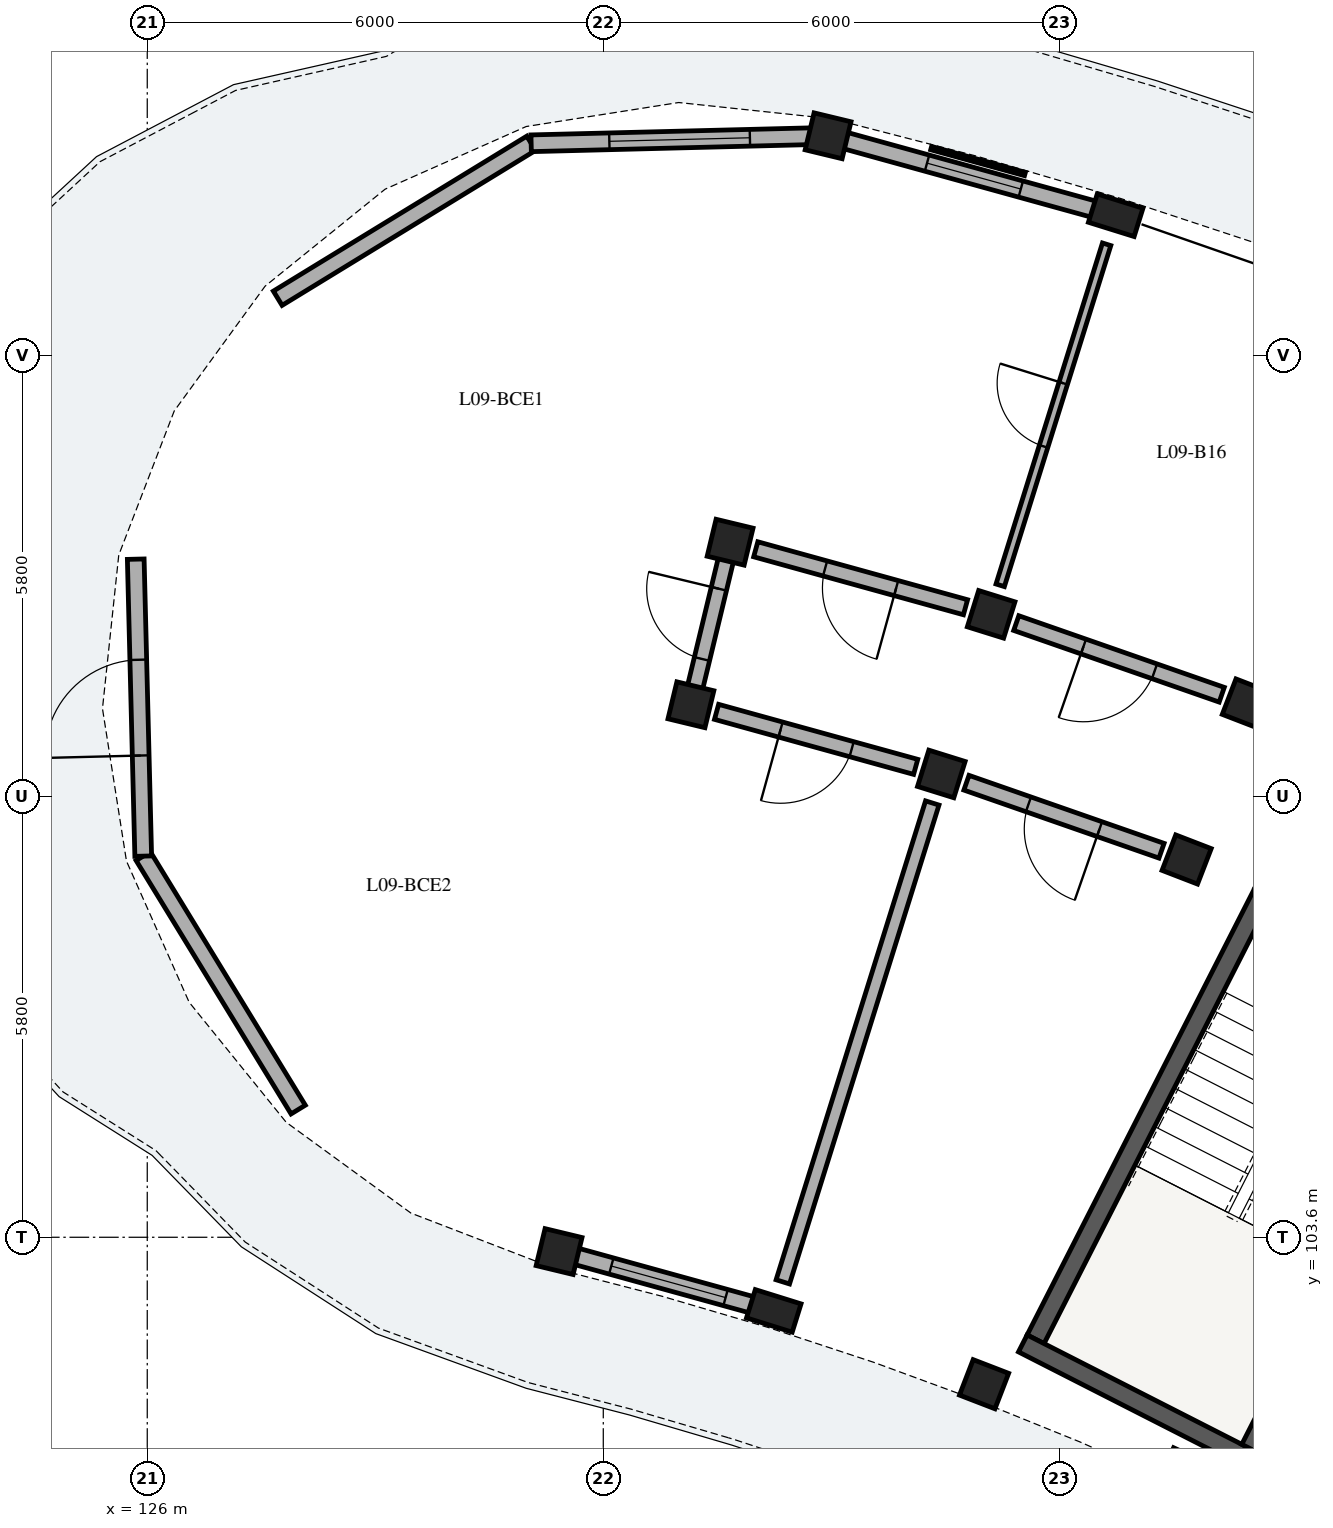
"""IFC4 building model, lengths in metres.
Left out: names, types, materials, properties, quantities, classifications, styles, units other than length and angle.
Written with IfcOpenShell. Run it as: python <this file> out.ifc"""

import sys

from ifc_helpers import new_model, si_unit, direction, frame, frame_2d, origin, origin_2d, place, context, subcontext, project, spatial, rectangle, extrude, element, fill, save


model = new_model("IFC4")
c1 = context("Model", 3, precision=1e-05, world=origin(), true_north=direction((0.0, 1.0)))
c2 = subcontext(c1, "Body", "Model", "MODEL_VIEW")
j1 = project(units=[si_unit("LENGTHUNIT", "METRE"), si_unit("PLANEANGLEUNIT", "RADIAN")], contexts=[c1])
p1 = place(None, origin())
s1 = spatial("IfcSite", under=j1, at=p1, CompositionType="ELEMENT")
p2 = place(p1, origin())
s2 = spatial("IfcBuilding", under=s1, at=p2, CompositionType="ELEMENT")
p3 = place(p2, frame((0.0, 0.0, 32.36)))
s3 = spatial("IfcBuildingStorey", under=s2, at=p3, CompositionType="ELEMENT", Elevation=32.36)
p4 = place(p3, frame((140.684, 108.139, 0.0), z_axis=(0.0, 0.0, 1.0), x_axis=(-0.453992276384, -0.891005618941, 0.0)))
e1 = element("IfcWall", 1, at=p4, inside=s3, PredefinedType="SHEAR", context=c2, shape_type="SweptSolid", body=[
    extrude(rectangle(XDim=6.6, YDim=0.25, at=frame_2d((3.3, 0.0))), origin(), (0.0, 0.0, 1.0), 3.11),
])
p5 = place(p3, frame((137.52, 102.203, 0.0), z_axis=(0.0, 0.0, 1.0), x_axis=(0.891003540237, -0.453996356025, 0.0)))
e2 = element("IfcWall", 2, at=p5, inside=s3, PredefinedType="SHEAR", context=c2, shape_type="SweptSolid", body=[
    extrude(rectangle(XDim=3.42, YDim=0.25, at=frame_2d((1.71, 0.0))), origin(), (0.0, 0.0, 1.0), 3.11),
])
p6 = place(p3, frame((143.509, 106.699, 0.0), z_axis=(0.0, 0.0, 1.0), x_axis=(-0.453992276384, -0.891005618941, 0.0)))
e3 = element("IfcWall", 3, at=p6, inside=s3, PredefinedType="SHEAR", context=c2, shape_type="SweptSolid", body=[
    extrude(rectangle(XDim=6.6, YDim=0.25, at=frame_2d((3.3, 0.0))), origin(), (0.0, 0.0, 1.0), 3.11),
])
p7 = place(p6, frame((0.22, 0.0, 0.0)))
e4 = element("IfcOpeningElement", 4, at=p7, cuts=e3, PredefinedType="OPENING", context=c2, shape_type="SweptSolid", body=[
    extrude(rectangle(XDim=1.05, YDim=2.15, at=frame_2d((0.525, 1.075))), frame((0.0, 0.135, 0.0), z_axis=(0.0, -1.0, 0.0), x_axis=(1.0, 0.0, 0.0)), (0.0, 0.0, 1.0), 0.27),
])
p8 = place(p3, frame((139.707, 100.522, 0.0), z_axis=(0.0, 0.0, 1.0), x_axis=(0.420859860775, 0.907125668024, 0.0)))
e5 = element("IfcColumn", 5, at=p8, inside=s3, PredefinedType="PILASTER", context=c2, shape_type="SweptSolid", body=[
    extrude(rectangle(XDim=0.39, YDim=0.63, at=origin_2d()), origin(), (0.0, 0.0, 1.0), 3.115),
])
for number, where, z_axis, x_axis in (
    (6, (137.01, 101.667, 0.0), (0.0, 0.0, 1.0), (0.36, 0.933, 0.0)),
    (7, (139.675, 108.57, 0.0), (0.0, 0.0, 1.0), (0.36, 0.933, 0.0)),
    (8, (140.468, 110.622, 0.0), (0.0, 0.0, 1.0), (0.36, 0.933, 0.0)),
):
    element("IfcColumn", number, at=place(p3, frame(where, z_axis=z_axis, x_axis=x_axis)), inside=s3, PredefinedType="COLUMN", context=c2, shape_type="SweptSolid", body=[
        extrude(rectangle(XDim=0.5, YDim=0.5, at=origin_2d()), origin(), (0.0, 0.0, 1.0), 3.115),
    ])
p9 = place(p3, frame((134.243, 102.631, 0.0), z_axis=(0.0, 0.0, 1.0), x_axis=(0.297930225503, 0.954587649581, 0.0)))
e9 = element("IfcColumn", 9, at=p9, inside=s3, PredefinedType="PILASTER", context=c2, shape_type="SweptSolid", body=[
    extrude(rectangle(XDim=0.39, YDim=0.63, at=origin_2d()), origin(), (0.0, 0.0, 1.0), 3.115),
])
for number, where, z_axis, x_axis in (
    (10, (136.448, 109.695, 0.0), (0.0, 0.0, 1.0), (0.298, 0.955, 0.0)),
    (11, (137.103, 111.795, 0.0), (0.0, 0.0, 1.0), (0.298, 0.955, 0.0)),
):
    element("IfcColumn", number, at=place(p3, frame(where, z_axis=z_axis, x_axis=x_axis)), inside=s3, PredefinedType="COLUMN", context=c2, shape_type="SweptSolid", body=[
        extrude(rectangle(XDim=0.5, YDim=0.5, at=origin_2d()), origin(), (0.0, 0.0, 1.0), 3.115),
    ])
p10 = place(p3, frame((138.742, 117.046, 0.0), z_axis=(0.0, 0.0, 1.0), x_axis=(0.297930225503, 0.954587649581, 0.0)))
e12 = element("IfcColumn", 12, at=p10, inside=s3, PredefinedType="PILASTER", context=c2, shape_type="SweptSolid", body=[
    extrude(rectangle(XDim=0.39, YDim=0.63, at=origin_2d()), origin(), (0.0, 0.0, 1.0), 3.115),
])
for number, where, z_axis, x_axis in (
    (13, (131.418, 103.412, 0.0), (0.0, 0.0, 1.0), (0.234, 0.972, 0.0)),
    (14, (133.153, 110.606, 0.0), (0.0, 0.0, 1.0), (0.234, 0.972, 0.0)),
    (15, (133.669, 112.744, 0.0), (0.0, 0.0, 1.0), (0.234, 0.972, 0.0)),
    (16, (134.958, 118.091, 0.0), (0.0, 0.0, 1.0), (0.234, 0.972, 0.0)),
):
    element("IfcColumn", number, at=place(p3, frame(where, z_axis=z_axis, x_axis=x_axis)), inside=s3, PredefinedType="COLUMN", context=c2, shape_type="SweptSolid", body=[
        extrude(rectangle(XDim=0.5, YDim=0.5, at=origin_2d()), origin(), (0.0, 0.0, 1.0), 3.115),
    ])
p11 = place(p3, frame((138.583, 117.09, 0.0), z_axis=(0.0, 0.0, 1.0), x_axis=(-0.963891366843, 0.266295762125, 0.0)))
e17 = element("IfcWall", 17, at=p11, inside=s3, PredefinedType="SOLIDWALL", context=c2, shape_type="SweptSolid", body=[
    extrude(rectangle(XDim=3.541, YDim=0.22, at=frame_2d((1.771, 0.0))), origin(), (0.0, 0.0, 1.0), 2.355),
])
p12 = place(p11, frame((1.13, 0.0, 0.55)))
e18 = element("IfcOpeningElement", 18, at=p12, cuts=e17, PredefinedType="OPENING", context=c2, shape_type="SweptSolid", body=[
    extrude(rectangle(XDim=1.28, YDim=1.56, at=frame_2d((0.64, 0.78))), frame((0.0, 0.12, 0.0), z_axis=(0.0, -1.0, 0.0), x_axis=(1.0, 0.0, 0.0)), (0.0, 0.0, 1.0), 0.24),
])
p13 = place(p3, frame((134.084, 102.675, 0.0), z_axis=(0.0, 0.0, 1.0), x_axis=(-0.963872968618, 0.26636234788, 0.0)))
e19 = element("IfcWall", 19, at=p13, inside=s3, PredefinedType="SOLIDWALL", context=c2, shape_type="SweptSolid", body=[
    extrude(rectangle(XDim=2.545, YDim=0.22, at=frame_2d((1.273, 0.0))), origin(), (0.0, 0.0, 1.0), 2.355),
])
p14 = place(p13, frame((0.493, 0.0, 0.55)))
e20 = element("IfcOpeningElement", 20, at=p14, cuts=e19, PredefinedType="OPENING", context=c2, shape_type="SweptSolid", body=[
    extrude(rectangle(XDim=1.56, YDim=1.51, at=frame_2d((0.78, 0.755))), frame((0.0, 0.12, 0.0), z_axis=(0.0, -1.0, 0.0), x_axis=(1.0, 0.0, 0.0)), (0.0, 0.0, 1.0), 0.24),
])
p15 = place(p3, frame((127.986, 105.28, 0.0), z_axis=(0.0, 0.0, 1.0), x_axis=(-0.521652131435, 0.85315828178, 0.0)))
e21 = element("IfcWall", 21, at=p15, inside=s3, PredefinedType="SOLIDWALL", context=c2, shape_type="SweptSolid", body=[
    extrude(rectangle(XDim=3.908, YDim=0.22, at=frame_2d((1.954, 0.0))), origin(), (0.0, 0.0, 1.0), 2.355),
])
p16 = place(p3, frame((125.947, 108.614, 0.0), z_axis=(0.0, 0.0, 1.0), x_axis=(-0.02523880178, 0.999681450706, 0.0)))
e22 = element("IfcWall", 22, at=p16, inside=s3, PredefinedType="SOLIDWALL", context=c2, shape_type="SweptSolid", body=[
    extrude(rectangle(XDim=3.908, YDim=0.22, at=frame_2d((1.954, 0.0))), origin(), (0.0, 0.0, 1.0), 2.355),
])
p17 = place(p16, frame((1.324, 0.0, 0.0)))
e23 = element("IfcOpeningElement", 23, at=p17, cuts=e22, PredefinedType="OPENING", context=c2, shape_type="SweptSolid", body=[
    extrude(rectangle(XDim=1.26, YDim=2.18, at=frame_2d((0.63, 1.09))), frame((0.0, 0.12, 0.0), z_axis=(0.0, -1.0, 0.0), x_axis=(1.0, 0.0, 0.0)), (0.0, 0.0, 1.0), 0.24),
])
p18 = place(p3, frame((127.717, 115.954, 0.0), z_axis=(0.0, 0.0, 1.0), x_axis=(0.85314128216, 0.521679933171, 0.0)))
e24 = element("IfcWall", 24, at=p18, inside=s3, PredefinedType="SOLIDWALL", context=c2, shape_type="SweptSolid", body=[
    extrude(rectangle(XDim=3.908, YDim=0.22, at=frame_2d((1.954, 0.0))), origin(), (0.0, 0.0, 1.0), 2.355),
])
p19 = place(p3, frame((131.051, 117.993, 0.0), z_axis=(0.0, 0.0, 1.0), x_axis=(0.999683064576, 0.025174796915, 0.0)))
e25 = element("IfcWall", 25, at=p19, inside=s3, PredefinedType="SOLIDWALL", context=c2, shape_type="SweptSolid", body=[
    extrude(rectangle(XDim=3.908, YDim=0.22, at=frame_2d((1.954, 0.0))), origin(), (0.0, 0.0, 1.0), 2.355),
])
p20 = place(p19, frame((1.029, 0.0, 0.4)))
e26 = element("IfcOpeningElement", 26, at=p20, cuts=e25, PredefinedType="OPENING", context=c2, shape_type="SweptSolid", body=[
    extrude(rectangle(XDim=1.85, YDim=1.72, at=frame_2d((0.925, 0.86))), frame((0.0, 0.12, 0.0), z_axis=(0.0, -1.0, 0.0), x_axis=(1.0, 0.0, 0.0)), (0.0, 0.0, 1.0), 0.24),
])
p21 = place(p3, frame((140.137, 110.738, 0.0), z_axis=(0.0, 0.0, 1.0), x_axis=(-0.944253820929, 0.329218349522, 0.0)))
e27 = element("IfcWall", 27, at=p21, inside=s3, PredefinedType="PARTITIONING", context=c2, shape_type="SweptSolid", body=[
    extrude(rectangle(XDim=2.863, YDim=0.205, at=frame_2d((1.432, 0.0))), origin(), (0.0, 0.0, 1.0), 2.37),
])
p22 = place(p21, frame((0.937, 0.0, 0.0)))
e28 = element("IfcOpeningElement", 28, at=p22, cuts=e27, PredefinedType="OPENING", context=c2, shape_type="SweptSolid", body=[
    extrude(rectangle(XDim=0.99, YDim=2.16, at=frame_2d((0.495, 1.08))), frame((0.0, 0.113, 0.0), z_axis=(0.0, -1.0, 0.0), x_axis=(1.0, 0.0, 0.0)), (0.0, 0.0, 1.0), 0.225),
])
p23 = place(p3, frame((139.345, 108.685, 0.0), z_axis=(0.0, 0.0, 1.0), x_axis=(-0.944265123647, 0.329185929627, 0.0)))
e29 = element("IfcWall", 29, at=p23, inside=s3, PredefinedType="PARTITIONING", context=c2, shape_type="SweptSolid", body=[
    extrude(rectangle(XDim=2.718, YDim=0.205, at=frame_2d((1.359, 0.0))), origin(), (0.0, 0.0, 1.0), 2.37),
])
p24 = place(p23, frame((0.864, 0.0, 0.0)))
e30 = element("IfcOpeningElement", 30, at=p24, cuts=e29, PredefinedType="OPENING", context=c2, shape_type="SweptSolid", body=[
    extrude(rectangle(XDim=0.99, YDim=2.16, at=frame_2d((0.495, 1.08))), frame((0.0, 0.113, 0.0), z_axis=(0.0, -1.0, 0.0), x_axis=(1.0, 0.0, 0.0)), (0.0, 0.0, 1.0), 0.225),
])
p25 = place(p3, frame((137.222, 112.177, 0.0), z_axis=(0.0, 0.0, 1.0), x_axis=(0.297905254614, 0.954595442726, 0.0)))
e31 = element("IfcWall", 31, at=p25, inside=s3, PredefinedType="PARTITIONING", context=c2, shape_type="SweptSolid", body=[
    extrude(rectangle(XDim=4.7, YDim=0.115, at=frame_2d((2.35, 0.0))), origin(), (0.0, 0.0, 1.0), 2.37),
])
p26 = place(p25, frame((1.915, 0.0, 0.0)))
e32 = element("IfcOpeningElement", 32, at=p26, cuts=e31, PredefinedType="OPENING", context=c2, shape_type="SweptSolid", body=[
    extrude(rectangle(XDim=0.87, YDim=2.08, at=frame_2d((0.435, 1.04))), frame((0.0, 0.067, 0.0), z_axis=(0.0, -1.0, 0.0), x_axis=(1.0, 0.0, 0.0)), (0.0, 0.0, 1.0), 0.135),
])
p27 = place(p3, frame((134.362, 103.013, 0.0), z_axis=(0.0, 0.0, 1.0), x_axis=(0.2979590431, 0.954578655028, 0.0)))
e33 = element("IfcWall", 33, at=p27, inside=s3, PredefinedType="PARTITIONING", context=c2, shape_type="SweptSolid", body=[
    extrude(rectangle(XDim=6.6, YDim=0.185, at=frame_2d((3.3, 0.0))), origin(), (0.0, 0.0, 1.0), 2.37),
])
p28 = place(p3, frame((136.766, 111.889, 0.0), z_axis=(0.0, 0.0, 1.0), x_axis=(-0.963890789093, 0.266297853356, 0.0)))
e34 = element("IfcWall", 34, at=p28, inside=s3, PredefinedType="PARTITIONING", context=c2, shape_type="SweptSolid", body=[
    extrude(rectangle(XDim=2.863, YDim=0.205, at=frame_2d((1.432, 0.0))), origin(), (0.0, 0.0, 1.0), 2.37),
])
p29 = place(p28, frame((0.947, 0.0, 0.0)))
e35 = element("IfcOpeningElement", 35, at=p29, cuts=e34, PredefinedType="OPENING", context=c2, shape_type="SweptSolid", body=[
    extrude(rectangle(XDim=0.97, YDim=2.15, at=frame_2d((0.485, 1.075))), frame((0.0, 0.113, 0.0), z_axis=(0.0, -1.0, 0.0), x_axis=(1.0, 0.0, 0.0)), (0.0, 0.0, 1.0), 0.225),
])
p30 = place(p3, frame((136.11, 109.789, 0.0), z_axis=(0.0, 0.0, 1.0), x_axis=(-0.96388375821, 0.266323301006, 0.0)))
e36 = element("IfcWall", 36, at=p30, inside=s3, PredefinedType="PARTITIONING", context=c2, shape_type="SweptSolid", body=[
    extrude(rectangle(XDim=2.718, YDim=0.205, at=frame_2d((1.359, 0.0))), origin(), (0.0, 0.0, 1.0), 2.37),
])
p31 = place(p30, frame((0.874, 0.0, 0.0)))
e37 = element("IfcOpeningElement", 37, at=p31, cuts=e36, PredefinedType="OPENING", context=c2, shape_type="SweptSolid", body=[
    extrude(rectangle(XDim=0.97, YDim=2.15, at=frame_2d((0.485, 1.075))), frame((0.0, 0.113, 0.0), z_axis=(0.0, -1.0, 0.0), x_axis=(1.0, 0.0, 0.0)), (0.0, 0.0, 1.0), 0.225),
])
p32 = place(p3, frame((133.165, 110.654, 0.0), z_axis=(0.0, 0.0, 1.0), x_axis=(0.23437535251, 0.972146179407, 0.0)))
e38 = element("IfcWall", 38, at=p32, inside=s3, PredefinedType="PARTITIONING", context=c2, shape_type="SweptSolid", body=[
    extrude(rectangle(XDim=2.1, YDim=0.205, at=frame_2d((1.05, 0.0))), origin(), (0.0, 0.0, 1.0), 2.37),
])
p33 = place(p32, frame((0.57, 0.0, 0.0)))
e39 = element("IfcOpeningElement", 39, at=p33, cuts=e38, PredefinedType="OPENING", context=c2, shape_type="SweptSolid", body=[
    extrude(rectangle(XDim=0.95, YDim=2.13, at=frame_2d((0.475, 1.065))), frame((0.0, 0.113, 0.0), z_axis=(0.0, -1.0, 0.0), x_axis=(1.0, 0.0, 0.0)), (0.0, 0.0, 1.0), 0.225),
])
p34 = place(p12, origin())
e40 = element("IfcWindow", 40, at=p34, inside=s3, PartitioningType="SINGLE_PANEL", PredefinedType="WINDOW", context=c2, shape_type="SweptSolid", body=[
    extrude(rectangle(XDim=1.28, YDim=1.56, at=frame_2d((0.64, 0.78))), frame((0.0, 0.03, 0.0), z_axis=(0.0, -1.0, 0.0), x_axis=(1.0, 0.0, 0.0)), (0.0, 0.0, 1.0), 0.06),
])
fill(e18, e40)
p35 = place(p14, origin())
e41 = element("IfcWindow", 41, at=p35, inside=s3, PartitioningType="SINGLE_PANEL", PredefinedType="WINDOW", context=c2, shape_type="SweptSolid", body=[
    extrude(rectangle(XDim=1.56, YDim=1.51, at=frame_2d((0.78, 0.755))), frame((0.0, 0.03, 0.0), z_axis=(0.0, -1.0, 0.0), x_axis=(1.0, 0.0, 0.0)), (0.0, 0.0, 1.0), 0.06),
])
fill(e20, e41)
p36 = place(p17, origin())
e42 = element("IfcDoor", 42, at=p36, inside=s3, OperationType="SINGLE_SWING_LEFT", PredefinedType="DOOR", context=c2, shape_type="SweptSolid", body=[
    extrude(rectangle(XDim=1.26, YDim=2.18, at=frame_2d((0.63, 1.09))), frame((0.0, 0.025, 0.0), z_axis=(0.0, -1.0, 0.0), x_axis=(1.0, 0.0, 0.0)), (0.0, 0.0, 1.0), 0.05),
])
fill(e23, e42)
p37 = place(p20, origin())
e43 = element("IfcWindow", 43, at=p37, inside=s3, PartitioningType="SINGLE_PANEL", PredefinedType="WINDOW", context=c2, shape_type="SweptSolid", body=[
    extrude(rectangle(XDim=1.85, YDim=1.72, at=frame_2d((0.925, 0.86))), frame((0.0, 0.03, 0.0), z_axis=(0.0, -1.0, 0.0), x_axis=(1.0, 0.0, 0.0)), (0.0, 0.0, 1.0), 0.06),
])
fill(e26, e43)
p38 = place(p22, origin())
e44 = element("IfcDoor", 44, at=p38, inside=s3, OperationType="SINGLE_SWING_RIGHT", PredefinedType="DOOR", context=c2, shape_type="SweptSolid", body=[
    extrude(rectangle(XDim=0.99, YDim=2.16, at=frame_2d((0.495, 1.08))), frame((0.0, 0.025, 0.0), z_axis=(0.0, -1.0, 0.0), x_axis=(1.0, 0.0, 0.0)), (0.0, 0.0, 1.0), 0.05),
])
fill(e28, e44)
p39 = place(p24, origin())
e45 = element("IfcDoor", 45, at=p39, inside=s3, OperationType="SINGLE_SWING_LEFT", PredefinedType="DOOR", context=c2, shape_type="SweptSolid", body=[
    extrude(rectangle(XDim=0.99, YDim=2.16, at=frame_2d((0.495, 1.08))), frame((0.0, 0.025, 0.0), z_axis=(0.0, -1.0, 0.0), x_axis=(1.0, 0.0, 0.0)), (0.0, 0.0, 1.0), 0.05),
])
fill(e30, e45)
p40 = place(p26, origin())
e46 = element("IfcDoor", 46, at=p40, inside=s3, OperationType="SINGLE_SWING_RIGHT", PredefinedType="DOOR", context=c2, shape_type="SweptSolid", body=[
    extrude(rectangle(XDim=0.87, YDim=2.08, at=frame_2d((0.435, 1.04))), frame((0.0, 0.025, 0.0), z_axis=(0.0, -1.0, 0.0), x_axis=(1.0, 0.0, 0.0)), (0.0, 0.0, 1.0), 0.05),
])
fill(e32, e46)
p41 = place(p29, origin())
e47 = element("IfcDoor", 47, at=p41, inside=s3, OperationType="SINGLE_SWING_LEFT", PredefinedType="DOOR", context=c2, shape_type="SweptSolid", body=[
    extrude(rectangle(XDim=0.97, YDim=2.15, at=frame_2d((0.485, 1.075))), frame((0.0, 0.025, 0.0), z_axis=(0.0, -1.0, 0.0), x_axis=(1.0, 0.0, 0.0)), (0.0, 0.0, 1.0), 0.05),
])
fill(e35, e47)
p42 = place(p31, origin())
e48 = element("IfcDoor", 48, at=p42, inside=s3, OperationType="SINGLE_SWING_RIGHT", PredefinedType="DOOR", context=c2, shape_type="SweptSolid", body=[
    extrude(rectangle(XDim=0.97, YDim=2.15, at=frame_2d((0.485, 1.075))), frame((0.0, 0.025, 0.0), z_axis=(0.0, -1.0, 0.0), x_axis=(1.0, 0.0, 0.0)), (0.0, 0.0, 1.0), 0.05),
])
fill(e37, e48)
p43 = place(p33, origin())
e49 = element("IfcDoor", 49, at=p43, inside=s3, OperationType="SINGLE_SWING_RIGHT", PredefinedType="DOOR", context=c2, shape_type="SweptSolid", body=[
    extrude(rectangle(XDim=0.95, YDim=2.13, at=frame_2d((0.475, 1.065))), frame((0.0, 0.025, 0.0), z_axis=(0.0, -1.0, 0.0), x_axis=(1.0, 0.0, 0.0)), (0.0, 0.0, 1.0), 0.05),
])
fill(e39, e49)
save(model, sys.argv[1])
